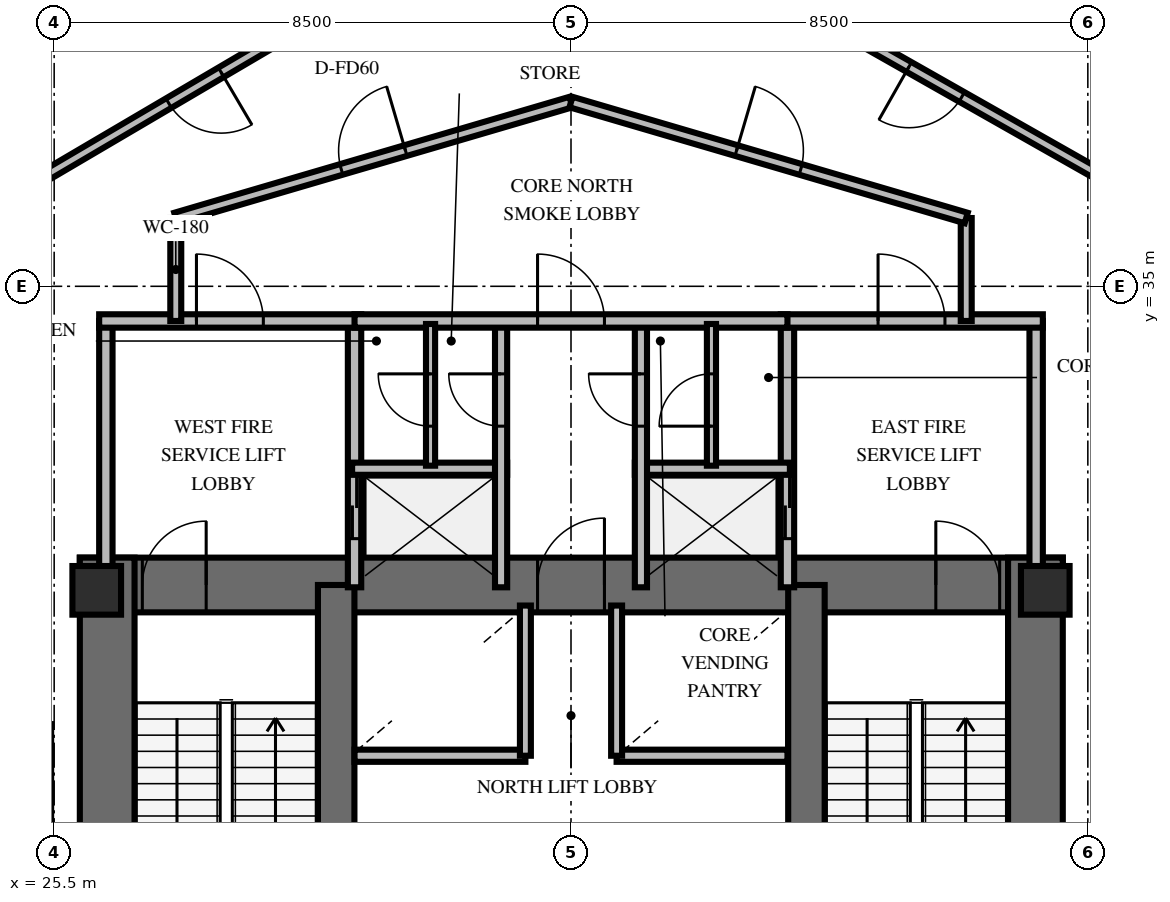
"""IFC4 building model, lengths in metres.
Left out: names, types, materials, properties, quantities, classifications, styles, units other than length and angle.
Written with IfcOpenShell. Run it as: python <this file> out.ifc"""

import sys

from ifc_helpers import new_model, si_unit, direction, frame, frame_2d, origin, origin_2d, place, context, subcontext, project, spatial, rectangle, extrude, element, fill, save


model = new_model("IFC4")
c1 = context("Model", 3, precision=1e-05, world=origin(), true_north=direction((0.0, 1.0)))
c2 = subcontext(c1, "Body", "Model", "MODEL_VIEW")
j1 = project(units=[si_unit("LENGTHUNIT", "METRE"), si_unit("PLANEANGLEUNIT", "RADIAN")], contexts=[c1])
p1 = place(None, origin())
s1 = spatial("IfcSite", under=j1, at=p1, CompositionType="ELEMENT")
p2 = place(p1, origin())
s2 = spatial("IfcBuilding", under=s1, at=p2, CompositionType="ELEMENT")
p3 = place(p2, frame((0.0, 0.0, 76.2)))
s3 = spatial("IfcBuildingStorey", under=s2, at=p3, CompositionType="ELEMENT", Elevation=76.2)
p4 = place(p3, frame((25.922, 30.088, 0.0), z_axis=(0.0, 0.0, 1.0), x_axis=(1.0, 0.0, 0.0)))
e1 = element("IfcWall", 1, at=p4, inside=s3, PredefinedType="SHEAR", context=c2, shape_type="SweptSolid", body=[
    extrude(rectangle(XDim=16.166, YDim=0.9, at=frame_2d((8.083, 0.0))), origin(), (0.0, 0.0, 1.0), 4.2),
])
p5 = place(p4, frame((1.028, 0.0, 0.0)))
e2 = element("IfcOpeningElement", 2, at=p5, cuts=e1, PredefinedType="OPENING", context=c2, shape_type="SweptSolid", body=[
    extrude(rectangle(XDim=1.05, YDim=2.15, at=frame_2d((0.525, 1.075))), frame((0.0, 0.46, 0.0), z_axis=(0.0, -1.0, 0.0), x_axis=(1.0, 0.0, 0.0)), (0.0, 0.0, 1.0), 0.92),
])
p6 = place(p4, frame((14.078, 0.0, 0.0)))
e3 = element("IfcOpeningElement", 3, at=p6, cuts=e1, PredefinedType="OPENING", context=c2, shape_type="SweptSolid", body=[
    extrude(rectangle(XDim=1.05, YDim=2.15, at=frame_2d((0.525, 1.075))), frame((0.0, 0.46, 0.0), z_axis=(0.0, -1.0, 0.0), x_axis=(1.0, 0.0, 0.0)), (0.0, 0.0, 1.0), 0.92),
])
p7 = place(p4, frame((7.528, 0.0, 0.0)))
e4 = element("IfcOpeningElement", 4, at=p7, cuts=e1, PredefinedType="OPENING", context=c2, shape_type="SweptSolid", body=[
    extrude(rectangle(XDim=1.1, YDim=2.15, at=frame_2d((0.55, 1.075))), frame((0.0, 0.46, 0.0), z_axis=(0.0, -1.0, 0.0), x_axis=(1.0, 0.0, 0.0)), (0.0, 0.0, 1.0), 0.92),
])
for number, where, z_axis, x_axis in (
    (5, (26.372, 19.662, 0.0), (0.0, 0.0, 1.0), (0.0, 1.0, 0.0)),
    (6, (41.638, 19.662, 0.0), (0.0, 0.0, 1.0), (0.0, 1.0, 0.0)),
):
    element("IfcWall", number, at=place(p3, frame(where, z_axis=z_axis, x_axis=x_axis)), inside=s3, PredefinedType="SHEAR", context=c2, shape_type="SweptSolid", body=[
        extrude(rectangle(XDim=10.876, YDim=0.9, at=frame_2d((5.438, 0.0))), origin(), (0.0, 0.0, 1.0), 4.2),
    ])
for number, where, z_axis, x_axis in (
    (7, (30.138, 20.112, 0.0), (0.0, 0.0, 1.0), (0.0, 1.0, 0.0)),
    (8, (37.872, 20.112, 0.0), (0.0, 0.0, 1.0), (0.0, 1.0, 0.0)),
):
    element("IfcWall", number, at=place(p3, frame(where, z_axis=z_axis, x_axis=x_axis)), inside=s3, PredefinedType="SHEAR", context=c2, shape_type="SweptSolid", body=[
        extrude(rectangle(XDim=9.976, YDim=0.6, at=frame_2d((4.988, 0.0))), origin(), (0.0, 0.0, 1.0), 4.2),
    ])
for number, where, z_axis, x_axis in (
    (9, (26.2, 30.0, 0.0), (0.0, 0.0, 1.0), (1.0, 0.0, 0.0)),
    (10, (41.8, 30.0, 0.0), (0.0, 0.0, 1.0), (1.0, 0.0, 0.0)),
):
    element("IfcColumn", number, at=place(p3, frame(where, z_axis=z_axis, x_axis=x_axis)), inside=s3, PredefinedType="PILASTER", context=c2, shape_type="SweptSolid", body=[
        extrude(rectangle(XDim=0.8, YDim=0.8, at=origin_2d()), origin(), (0.0, 0.0, 1.0), 4.2),
    ])
p8 = place(p3, frame((26.35, 30.05, 0.0), z_axis=(0.0, 0.0, 1.0), x_axis=(0.0, 1.0, 0.0)))
e11 = element("IfcWall", 11, at=p8, inside=s3, PredefinedType="SOLIDWALL", context=c2, shape_type="SweptSolid", body=[
    extrude(rectangle(XDim=4.38, YDim=0.22, at=frame_2d((2.19, 0.0))), origin(), (0.0, 0.0, 1.0), 3.0),
])
p9 = place(p3, frame((30.44, 30.05, 0.0), z_axis=(0.0, 0.0, 1.0), x_axis=(0.0, 1.0, 0.0)))
e12 = element("IfcWall", 12, at=p9, inside=s3, PredefinedType="SOLIDWALL", context=c2, shape_type="SweptSolid", body=[
    extrude(rectangle(XDim=4.38, YDim=0.22, at=frame_2d((2.19, 0.0))), origin(), (0.0, 0.0, 1.0), 3.0),
])
p10 = place(p9, frame((0.8, 0.0, 0.0)))
e13 = element("IfcOpeningElement", 13, at=p10, cuts=e12, PredefinedType="OPENING", context=c2, shape_type="SweptSolid", body=[
    extrude(rectangle(XDim=1.05, YDim=2.1, at=frame_2d((0.525, 1.05))), frame((0.0, 0.12, 0.0), z_axis=(0.0, -1.0, 0.0), x_axis=(1.0, 0.0, 0.0)), (0.0, 0.0, 1.0), 0.24),
])
p11 = place(p3, frame((26.24, 34.43, 0.0), z_axis=(0.0, 0.0, 1.0), x_axis=(1.0, 0.0, 0.0)))
e14 = element("IfcWall", 14, at=p11, inside=s3, PredefinedType="SOLIDWALL", context=c2, shape_type="SweptSolid", body=[
    extrude(rectangle(XDim=4.31, YDim=0.22, at=frame_2d((2.155, 0.0))), origin(), (0.0, 0.0, 1.0), 3.0),
])
p12 = place(p11, frame((1.6, 0.0, 0.0)))
e15 = element("IfcOpeningElement", 15, at=p12, cuts=e14, PredefinedType="OPENING", context=c2, shape_type="SweptSolid", body=[
    extrude(rectangle(XDim=1.1, YDim=2.15, at=frame_2d((0.55, 1.075))), frame((0.0, 0.12, 0.0), z_axis=(0.0, -1.0, 0.0), x_axis=(1.0, 0.0, 0.0)), (0.0, 0.0, 1.0), 0.24),
])
p13 = place(p3, frame((30.4, 32.0, 0.0), z_axis=(0.0, 0.0, 1.0), x_axis=(1.0, 0.0, 0.0)))
e16 = element("IfcWall", 16, at=p13, inside=s3, PredefinedType="SOLIDWALL", context=c2, shape_type="SweptSolid", body=[
    extrude(rectangle(XDim=2.55, YDim=0.2, at=frame_2d((1.275, 0.0))), origin(), (0.0, 0.0, 1.0), 3.0),
])
p14 = place(p3, frame((32.85, 30.05, 0.0), z_axis=(0.0, 0.0, 1.0), x_axis=(0.0, 1.0, 0.0)))
e17 = element("IfcWall", 17, at=p14, inside=s3, PredefinedType="SOLIDWALL", context=c2, shape_type="SweptSolid", body=[
    extrude(rectangle(XDim=4.38, YDim=0.2, at=frame_2d((2.19, 0.0))), origin(), (0.0, 0.0, 1.0), 3.0),
])
p15 = place(p14, frame((2.65, 0.0, 0.0)))
e18 = element("IfcOpeningElement", 18, at=p15, cuts=e17, PredefinedType="OPENING", context=c2, shape_type="SweptSolid", body=[
    extrude(rectangle(XDim=0.86, YDim=2.05, at=frame_2d((0.43, 1.025))), frame((0.0, 0.11, 0.0), z_axis=(0.0, -1.0, 0.0), x_axis=(1.0, 0.0, 0.0)), (0.0, 0.0, 1.0), 0.22),
])
p16 = place(p3, frame((37.56, 30.05, 0.0), z_axis=(0.0, 0.0, 1.0), x_axis=(0.0, 1.0, 0.0)))
e19 = element("IfcWall", 19, at=p16, inside=s3, PredefinedType="SOLIDWALL", context=c2, shape_type="SweptSolid", body=[
    extrude(rectangle(XDim=4.38, YDim=0.22, at=frame_2d((2.19, 0.0))), origin(), (0.0, 0.0, 1.0), 3.0),
])
p17 = place(p16, frame((0.8, 0.0, 0.0)))
e20 = element("IfcOpeningElement", 20, at=p17, cuts=e19, PredefinedType="OPENING", context=c2, shape_type="SweptSolid", body=[
    extrude(rectangle(XDim=1.05, YDim=2.1, at=frame_2d((0.525, 1.05))), frame((0.0, 0.12, 0.0), z_axis=(0.0, -1.0, 0.0), x_axis=(1.0, 0.0, 0.0)), (0.0, 0.0, 1.0), 0.24),
])
p18 = place(p3, frame((41.65, 30.05, 0.0), z_axis=(0.0, 0.0, 1.0), x_axis=(0.0, 1.0, 0.0)))
e21 = element("IfcWall", 21, at=p18, inside=s3, PredefinedType="SOLIDWALL", context=c2, shape_type="SweptSolid", body=[
    extrude(rectangle(XDim=4.38, YDim=0.22, at=frame_2d((2.19, 0.0))), origin(), (0.0, 0.0, 1.0), 3.0),
])
p19 = place(p3, frame((37.45, 34.43, 0.0), z_axis=(0.0, 0.0, 1.0), x_axis=(1.0, 0.0, 0.0)))
e22 = element("IfcWall", 22, at=p19, inside=s3, PredefinedType="SOLIDWALL", context=c2, shape_type="SweptSolid", body=[
    extrude(rectangle(XDim=4.31, YDim=0.22, at=frame_2d((2.155, 0.0))), origin(), (0.0, 0.0, 1.0), 3.0),
])
p20 = place(p19, frame((1.6, 0.0, 0.0)))
e23 = element("IfcOpeningElement", 23, at=p20, cuts=e22, PredefinedType="OPENING", context=c2, shape_type="SweptSolid", body=[
    extrude(rectangle(XDim=1.1, YDim=2.15, at=frame_2d((0.55, 1.075))), frame((0.0, 0.12, 0.0), z_axis=(0.0, -1.0, 0.0), x_axis=(1.0, 0.0, 0.0)), (0.0, 0.0, 1.0), 0.24),
])
p21 = place(p3, frame((35.05, 32.0, 0.0), z_axis=(0.0, 0.0, 1.0), x_axis=(1.0, 0.0, 0.0)))
e24 = element("IfcWall", 24, at=p21, inside=s3, PredefinedType="SOLIDWALL", context=c2, shape_type="SweptSolid", body=[
    extrude(rectangle(XDim=2.55, YDim=0.2, at=frame_2d((1.275, 0.0))), origin(), (0.0, 0.0, 1.0), 3.0),
])
p22 = place(p3, frame((35.15, 30.05, 0.0), z_axis=(0.0, 0.0, 1.0), x_axis=(0.0, 1.0, 0.0)))
e25 = element("IfcWall", 25, at=p22, inside=s3, PredefinedType="SOLIDWALL", context=c2, shape_type="SweptSolid", body=[
    extrude(rectangle(XDim=4.38, YDim=0.2, at=frame_2d((2.19, 0.0))), origin(), (0.0, 0.0, 1.0), 3.0),
])
p23 = place(p22, frame((2.65, 0.0, 0.0)))
e26 = element("IfcOpeningElement", 26, at=p23, cuts=e25, PredefinedType="OPENING", context=c2, shape_type="SweptSolid", body=[
    extrude(rectangle(XDim=0.86, YDim=2.05, at=frame_2d((0.43, 1.025))), frame((0.0, 0.11, 0.0), z_axis=(0.0, -1.0, 0.0), x_axis=(1.0, 0.0, 0.0)), (0.0, 0.0, 1.0), 0.22),
])
p24 = place(p3, frame((30.44, 34.43, 0.0), z_axis=(0.0, 0.0, 1.0), x_axis=(1.0, 0.0, 0.0)))
e27 = element("IfcWall", 27, at=p24, inside=s3, PredefinedType="SOLIDWALL", context=c2, shape_type="SweptSolid", body=[
    extrude(rectangle(XDim=7.12, YDim=0.22, at=frame_2d((3.56, 0.0))), origin(), (0.0, 0.0, 1.0), 3.0),
])
p25 = place(p24, frame((3.01, 0.0, 0.0)))
e28 = element("IfcOpeningElement", 28, at=p25, cuts=e27, PredefinedType="OPENING", context=c2, shape_type="SweptSolid", body=[
    extrude(rectangle(XDim=1.1, YDim=2.15, at=frame_2d((0.55, 1.075))), frame((0.0, 0.12, 0.0), z_axis=(0.0, -1.0, 0.0), x_axis=(1.0, 0.0, 0.0)), (0.0, 0.0, 1.0), 0.24),
])
p26 = place(p3, frame((31.69, 32.05, 0.0), z_axis=(0.0, 0.0, 1.0), x_axis=(0.0, 1.0, 0.0)))
e29 = element("IfcWall", 29, at=p26, inside=s3, PredefinedType="PARTITIONING", context=c2, shape_type="SweptSolid", body=[
    extrude(rectangle(XDim=2.33, YDim=0.15, at=frame_2d((1.165, 0.0))), origin(), (0.0, 0.0, 1.0), 3.0),
])
p27 = place(p26, frame((0.65, 0.0, 0.0)))
e30 = element("IfcOpeningElement", 30, at=p27, cuts=e29, PredefinedType="OPENING", context=c2, shape_type="SweptSolid", body=[
    extrude(rectangle(XDim=0.86, YDim=2.05, at=frame_2d((0.43, 1.025))), frame((0.0, 0.085, 0.0), z_axis=(0.0, -1.0, 0.0), x_axis=(1.0, 0.0, 0.0)), (0.0, 0.0, 1.0), 0.17),
])
p28 = place(p3, frame((36.31, 32.05, 0.0), z_axis=(0.0, 0.0, 1.0), x_axis=(0.0, 1.0, 0.0)))
e31 = element("IfcWall", 31, at=p28, inside=s3, PredefinedType="PARTITIONING", context=c2, shape_type="SweptSolid", body=[
    extrude(rectangle(XDim=2.33, YDim=0.15, at=frame_2d((1.165, 0.0))), origin(), (0.0, 0.0, 1.0), 3.0),
])
p29 = place(p28, frame((0.65, 0.0, 0.0)))
e32 = element("IfcOpeningElement", 32, at=p29, cuts=e31, PredefinedType="OPENING", context=c2, shape_type="SweptSolid", body=[
    extrude(rectangle(XDim=0.86, YDim=2.05, at=frame_2d((0.43, 1.025))), frame((0.0, 0.085, 0.0), z_axis=(0.0, -1.0, 0.0), x_axis=(1.0, 0.0, 0.0)), (0.0, 0.0, 1.0), 0.17),
])
p30 = place(p3, frame((30.44, 27.28, 0.0), z_axis=(0.0, 0.0, 1.0), x_axis=(1.0, 0.0, 0.0)))
e33 = element("IfcWall", 33, at=p30, inside=s3, PredefinedType="SOLIDWALL", context=c2, shape_type="SweptSolid", body=[
    extrude(rectangle(XDim=2.81, YDim=0.2, at=frame_2d((1.405, 0.0))), origin(), (0.0, 0.0, 1.0), 3.0),
])
p31 = place(p3, frame((33.25, 27.28, 0.0), z_axis=(0.0, 0.0, 1.0), x_axis=(0.0, 1.0, 0.0)))
e34 = element("IfcWall", 34, at=p31, inside=s3, PredefinedType="SOLIDWALL", context=c2, shape_type="SweptSolid", body=[
    extrude(rectangle(XDim=2.47, YDim=0.18, at=frame_2d((1.235, 0.0))), origin(), (0.0, 0.0, 1.0), 3.0),
])
p32 = place(p3, frame((34.75, 27.28, 0.0), z_axis=(0.0, 0.0, 1.0), x_axis=(1.0, 0.0, 0.0)))
e35 = element("IfcWall", 35, at=p32, inside=s3, PredefinedType="SOLIDWALL", context=c2, shape_type="SweptSolid", body=[
    extrude(rectangle(XDim=2.81, YDim=0.2, at=frame_2d((1.405, 0.0))), origin(), (0.0, 0.0, 1.0), 3.0),
])
p33 = place(p3, frame((34.75, 27.28, 0.0), z_axis=(0.0, 0.0, 1.0), x_axis=(0.0, 1.0, 0.0)))
e36 = element("IfcWall", 36, at=p33, inside=s3, PredefinedType="SOLIDWALL", context=c2, shape_type="SweptSolid", body=[
    extrude(rectangle(XDim=2.47, YDim=0.18, at=frame_2d((1.235, 0.0))), origin(), (0.0, 0.0, 1.0), 3.0),
])
for number, where, z_axis, x_axis in (
    (37, (27.5, 34.43, 0.0), (0.0, 0.0, 1.0), (0.0, 1.0, 0.0)),
    (38, (40.5, 36.123, 0.0), (0.0, 0.0, 1.0), (0.0, -1.0, 0.0)),
):
    element("IfcWall", number, at=place(p3, frame(where, z_axis=z_axis, x_axis=x_axis)), inside=s3, PredefinedType="PARTITIONING", context=c2, shape_type="SweptSolid", body=[
        extrude(rectangle(XDim=1.693, YDim=0.18, at=frame_2d((0.846, 0.0))), origin(), (0.0, 0.0, 1.0), 3.0),
    ])
p34 = place(p3, frame((27.5, 36.123, 0.0), z_axis=(0.0, 0.0, 1.0), x_axis=(0.959546654541, 0.281549671923, 0.0)))
e39 = element("IfcWall", 39, at=p34, inside=s3, PredefinedType="PARTITIONING", context=c2, shape_type="SweptSolid", body=[
    extrude(rectangle(XDim=6.774, YDim=0.18, at=frame_2d((3.387, 0.0))), origin(), (0.0, 0.0, 1.0), 3.0),
])
p35 = place(p34, frame((2.837, 0.0, 0.0)))
e40 = element("IfcOpeningElement", 40, at=p35, cuts=e39, PredefinedType="OPENING", context=c2, shape_type="SweptSolid", body=[
    extrude(rectangle(XDim=1.1, YDim=2.15, at=frame_2d((0.55, 1.075))), frame((0.0, 0.1, 0.0), z_axis=(0.0, -1.0, 0.0), x_axis=(1.0, 0.0, 0.0)), (0.0, 0.0, 1.0), 0.2),
])
p36 = place(p3, frame((34.0, 38.03, 0.0), z_axis=(0.0, 0.0, 1.0), x_axis=(0.959546654541, -0.281549671923, 0.0)))
e41 = element("IfcWall", 41, at=p36, inside=s3, PredefinedType="PARTITIONING", context=c2, shape_type="SweptSolid", body=[
    extrude(rectangle(XDim=6.774, YDim=0.18, at=frame_2d((3.387, 0.0))), origin(), (0.0, 0.0, 1.0), 3.0),
])
p37 = place(p36, frame((2.837, 0.0, 0.0)))
e42 = element("IfcOpeningElement", 42, at=p37, cuts=e41, PredefinedType="OPENING", context=c2, shape_type="SweptSolid", body=[
    extrude(rectangle(XDim=1.1, YDim=2.15, at=frame_2d((0.55, 1.075))), frame((0.0, 0.1, 0.0), z_axis=(0.0, -1.0, 0.0), x_axis=(1.0, 0.0, 0.0)), (0.0, 0.0, 1.0), 0.2),
])
p38 = place(p3, frame((42.864, 36.733, 0.0), z_axis=(0.0, 0.0, 1.0), x_axis=(-0.869944192354, 0.493150182186, 0.0)))
e43 = element("IfcWall", 43, at=p38, inside=s3, PredefinedType="PARTITIONING", context=c2, shape_type="SweptSolid", body=[
    extrude(rectangle(XDim=4.834, YDim=0.18, at=frame_2d((2.417, 0.0))), origin(), (0.0, 0.0, 1.0), 3.0),
])
p39 = place(p38, frame((2.801, 0.0, 0.0)))
e44 = element("IfcOpeningElement", 44, at=p39, cuts=e43, PredefinedType="OPENING", context=c2, shape_type="SweptSolid", body=[
    extrude(rectangle(XDim=1.0, YDim=2.15, at=frame_2d((0.5, 1.075))), frame((0.0, 0.1, 0.0), z_axis=(0.0, -1.0, 0.0), x_axis=(1.0, 0.0, 0.0)), (0.0, 0.0, 1.0), 0.2),
])
p40 = place(p3, frame((29.136, 39.043, 0.0), z_axis=(0.0, 0.0, 1.0), x_axis=(-0.862070500673, -0.506788369904, 0.0)))
e45 = element("IfcWall", 45, at=p40, inside=s3, PredefinedType="PARTITIONING", context=c2, shape_type="SweptSolid", body=[
    extrude(rectangle(XDim=4.834, YDim=0.18, at=frame_2d((2.417, 0.0))), origin(), (0.0, 0.0, 1.0), 3.0),
])
p41 = place(p40, frame((1.034, 0.0, 0.0)))
e46 = element("IfcOpeningElement", 46, at=p41, cuts=e45, PredefinedType="OPENING", context=c2, shape_type="SweptSolid", body=[
    extrude(rectangle(XDim=1.0, YDim=2.15, at=frame_2d((0.5, 1.075))), frame((0.0, 0.1, 0.0), z_axis=(0.0, -1.0, 0.0), x_axis=(1.0, 0.0, 0.0)), (0.0, 0.0, 1.0), 0.2),
])
p42 = place(p5, origin())
e47 = element("IfcDoor", 47, at=p42, inside=s3, OperationType="SINGLE_SWING_RIGHT", PredefinedType="DOOR", context=c2, shape_type="SweptSolid", body=[
    extrude(rectangle(XDim=1.05, YDim=2.15, at=frame_2d((0.525, 1.075))), frame((0.0, 0.025, 0.0), z_axis=(0.0, -1.0, 0.0), x_axis=(1.0, 0.0, 0.0)), (0.0, 0.0, 1.0), 0.05),
])
fill(e2, e47)
p43 = place(p6, origin())
e48 = element("IfcDoor", 48, at=p43, inside=s3, OperationType="SINGLE_SWING_LEFT", PredefinedType="DOOR", context=c2, shape_type="SweptSolid", body=[
    extrude(rectangle(XDim=1.05, YDim=2.15, at=frame_2d((0.525, 1.075))), frame((0.0, 0.025, 0.0), z_axis=(0.0, -1.0, 0.0), x_axis=(1.0, 0.0, 0.0)), (0.0, 0.0, 1.0), 0.05),
])
fill(e3, e48)
p44 = place(p7, origin())
e49 = element("IfcDoor", 49, at=p44, inside=s3, OperationType="SINGLE_SWING_RIGHT", PredefinedType="DOOR", context=c2, shape_type="SweptSolid", body=[
    extrude(rectangle(XDim=1.1, YDim=2.15, at=frame_2d((0.55, 1.075))), frame((0.0, 0.025, 0.0), z_axis=(0.0, -1.0, 0.0), x_axis=(1.0, 0.0, 0.0)), (0.0, 0.0, 1.0), 0.05),
])
fill(e4, e49)
p45 = place(p12, origin())
e50 = element("IfcDoor", 50, at=p45, inside=s3, OperationType="SINGLE_SWING_LEFT", PredefinedType="DOOR", context=c2, shape_type="SweptSolid", body=[
    extrude(rectangle(XDim=1.1, YDim=2.15, at=frame_2d((0.55, 1.075))), frame((0.0, 0.025, 0.0), z_axis=(0.0, -1.0, 0.0), x_axis=(1.0, 0.0, 0.0)), (0.0, 0.0, 1.0), 0.05),
])
fill(e15, e50)
p46 = place(p10, origin())
e51 = element("IfcDoor", 51, at=p46, inside=s3, OperationType="DOUBLE_DOOR_SLIDING", PredefinedType="USERDEFINED", context=c2, shape_type="SweptSolid", body=[
    extrude(rectangle(XDim=1.05, YDim=2.1, at=frame_2d((0.525, 1.05))), frame((0.0, 0.025, 0.0), z_axis=(0.0, -1.0, 0.0), x_axis=(1.0, 0.0, 0.0)), (0.0, 0.0, 1.0), 0.05),
])
fill(e13, e51)
p47 = place(p15, origin())
e52 = element("IfcDoor", 52, at=p47, inside=s3, OperationType="SINGLE_SWING_RIGHT", PredefinedType="TRAPDOOR", context=c2, shape_type="SweptSolid", body=[
    extrude(rectangle(XDim=0.86, YDim=2.05, at=frame_2d((0.43, 1.025))), frame((0.0, 0.025, 0.0), z_axis=(0.0, -1.0, 0.0), x_axis=(1.0, 0.0, 0.0)), (0.0, 0.0, 1.0), 0.05),
])
fill(e18, e52)
p48 = place(p20, origin())
e53 = element("IfcDoor", 53, at=p48, inside=s3, OperationType="SINGLE_SWING_LEFT", PredefinedType="DOOR", context=c2, shape_type="SweptSolid", body=[
    extrude(rectangle(XDim=1.1, YDim=2.15, at=frame_2d((0.55, 1.075))), frame((0.0, 0.025, 0.0), z_axis=(0.0, -1.0, 0.0), x_axis=(1.0, 0.0, 0.0)), (0.0, 0.0, 1.0), 0.05),
])
fill(e23, e53)
p49 = place(p17, origin())
e54 = element("IfcDoor", 54, at=p49, inside=s3, OperationType="DOUBLE_DOOR_SLIDING", PredefinedType="USERDEFINED", context=c2, shape_type="SweptSolid", body=[
    extrude(rectangle(XDim=1.05, YDim=2.1, at=frame_2d((0.525, 1.05))), frame((0.0, 0.025, 0.0), z_axis=(0.0, -1.0, 0.0), x_axis=(1.0, 0.0, 0.0)), (0.0, 0.0, 1.0), 0.05),
])
fill(e20, e54)
p50 = place(p23, origin())
e55 = element("IfcDoor", 55, at=p50, inside=s3, OperationType="SINGLE_SWING_RIGHT", PredefinedType="TRAPDOOR", context=c2, shape_type="SweptSolid", body=[
    extrude(rectangle(XDim=0.86, YDim=2.05, at=frame_2d((0.43, 1.025))), frame((0.0, 0.025, 0.0), z_axis=(0.0, -1.0, 0.0), x_axis=(1.0, 0.0, 0.0)), (0.0, 0.0, 1.0), 0.05),
])
fill(e26, e55)
p51 = place(p25, origin())
e56 = element("IfcDoor", 56, at=p51, inside=s3, OperationType="SINGLE_SWING_LEFT", PredefinedType="DOOR", context=c2, shape_type="SweptSolid", body=[
    extrude(rectangle(XDim=1.1, YDim=2.15, at=frame_2d((0.55, 1.075))), frame((0.0, 0.025, 0.0), z_axis=(0.0, -1.0, 0.0), x_axis=(1.0, 0.0, 0.0)), (0.0, 0.0, 1.0), 0.05),
])
fill(e28, e56)
p52 = place(p27, origin())
e57 = element("IfcDoor", 57, at=p52, inside=s3, OperationType="SINGLE_SWING_RIGHT", PredefinedType="TRAPDOOR", context=c2, shape_type="SweptSolid", body=[
    extrude(rectangle(XDim=0.86, YDim=2.05, at=frame_2d((0.43, 1.025))), frame((0.0, 0.025, 0.0), z_axis=(0.0, -1.0, 0.0), x_axis=(1.0, 0.0, 0.0)), (0.0, 0.0, 1.0), 0.05),
])
fill(e30, e57)
p53 = place(p29, origin())
e58 = element("IfcDoor", 58, at=p53, inside=s3, OperationType="SINGLE_SWING_LEFT", PredefinedType="TRAPDOOR", context=c2, shape_type="SweptSolid", body=[
    extrude(rectangle(XDim=0.86, YDim=2.05, at=frame_2d((0.43, 1.025))), frame((0.0, 0.025, 0.0), z_axis=(0.0, -1.0, 0.0), x_axis=(1.0, 0.0, 0.0)), (0.0, 0.0, 1.0), 0.05),
])
fill(e32, e58)
p54 = place(p35, origin())
e59 = element("IfcDoor", 59, at=p54, inside=s3, OperationType="SINGLE_SWING_RIGHT", PredefinedType="DOOR", context=c2, shape_type="SweptSolid", body=[
    extrude(rectangle(XDim=1.1, YDim=2.15, at=frame_2d((0.55, 1.075))), frame((0.0, 0.025, 0.0), z_axis=(0.0, -1.0, 0.0), x_axis=(1.0, 0.0, 0.0)), (0.0, 0.0, 1.0), 0.05),
])
fill(e40, e59)
p55 = place(p37, origin())
e60 = element("IfcDoor", 60, at=p55, inside=s3, OperationType="SINGLE_SWING_LEFT", PredefinedType="DOOR", context=c2, shape_type="SweptSolid", body=[
    extrude(rectangle(XDim=1.1, YDim=2.15, at=frame_2d((0.55, 1.075))), frame((0.0, 0.025, 0.0), z_axis=(0.0, -1.0, 0.0), x_axis=(1.0, 0.0, 0.0)), (0.0, 0.0, 1.0), 0.05),
])
fill(e42, e60)
p56 = place(p39, origin())
e61 = element("IfcDoor", 61, at=p56, inside=s3, OperationType="SINGLE_SWING_RIGHT", PredefinedType="DOOR", context=c2, shape_type="SweptSolid", body=[
    extrude(rectangle(XDim=1.0, YDim=2.15, at=frame_2d((0.5, 1.075))), frame((0.0, 0.025, 0.0), z_axis=(0.0, -1.0, 0.0), x_axis=(1.0, 0.0, 0.0)), (0.0, 0.0, 1.0), 0.05),
])
fill(e44, e61)
p57 = place(p41, origin())
e62 = element("IfcDoor", 62, at=p57, inside=s3, OperationType="SINGLE_SWING_LEFT", PredefinedType="DOOR", context=c2, shape_type="SweptSolid", body=[
    extrude(rectangle(XDim=1.0, YDim=2.15, at=frame_2d((0.5, 1.075))), frame((0.0, 0.025, 0.0), z_axis=(0.0, -1.0, 0.0), x_axis=(1.0, 0.0, 0.0)), (0.0, 0.0, 1.0), 0.05),
])
fill(e46, e62)
save(model, sys.argv[1])
